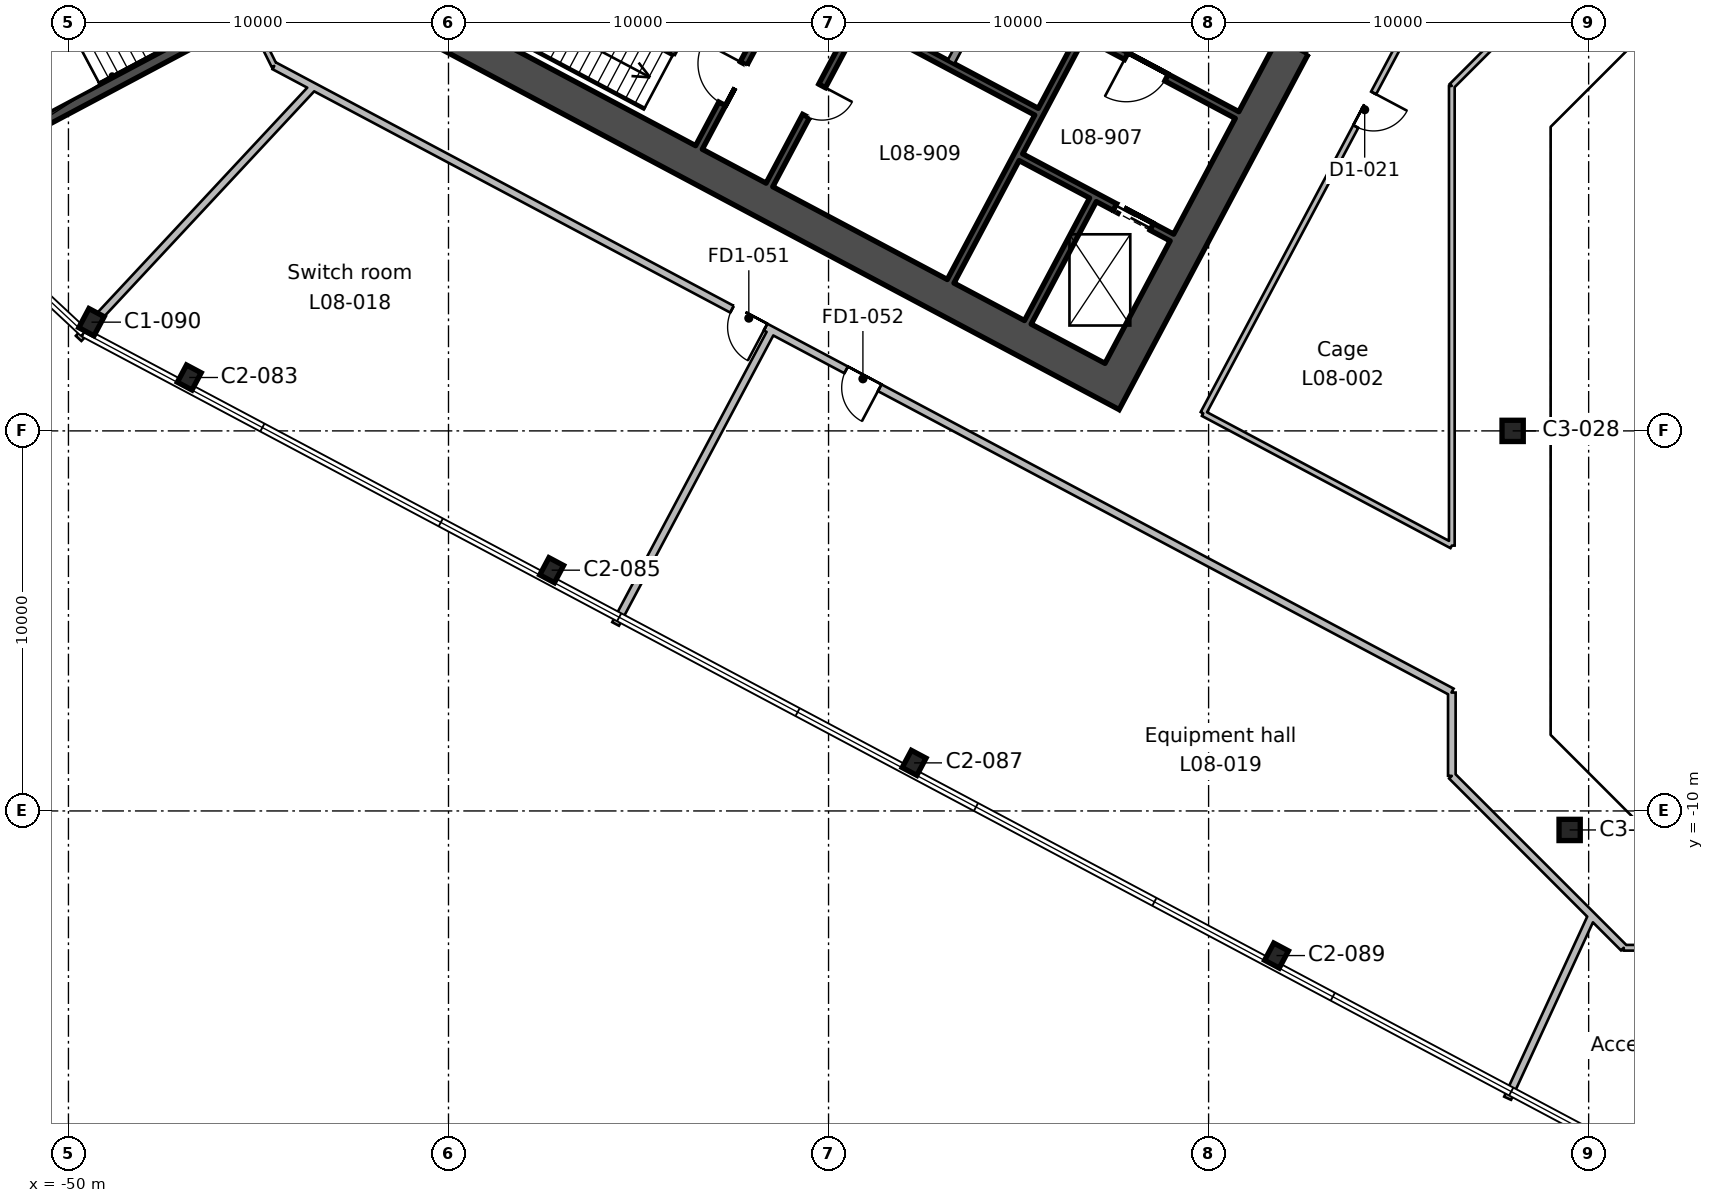
"""IFC4 building model, lengths in metres.
Left out: names, types, materials, properties, quantities, classifications, styles, units other than length and angle.
Written with IfcOpenShell. Run it as: python <this file> out.ifc"""

import sys

from ifc_helpers import new_model, si_unit, direction, frame, frame_2d, origin, origin_2d, place, context, subcontext, project, spatial, rectangle, hollow_rectangle, i_section, extrude, element, fill, save


model = new_model("IFC4")
c1 = context("Model", 3, precision=1e-05, world=origin(), true_north=direction((0.0, 1.0)))
c2 = subcontext(c1, "Body", "Model", "MODEL_VIEW")
j1 = project(units=[si_unit("LENGTHUNIT", "METRE"), si_unit("PLANEANGLEUNIT", "RADIAN")], contexts=[c1])
p1 = place(None, origin())
s1 = spatial("IfcSite", under=j1, at=p1, CompositionType="ELEMENT")
p2 = place(p1, origin())
s2 = spatial("IfcBuilding", under=s1, at=p2, CompositionType="ELEMENT")
p3 = place(p2, frame((0.0, 0.0, 44.6)))
s3 = spatial("IfcBuildingStorey", under=s2, at=p3, CompositionType="ELEMENT", Elevation=44.6)
p4 = place(p3, frame((-18.213, -13.805, 0.0), z_axis=(0.0, 0.0, 1.0), x_axis=(0.882947592859, -0.469471562786, 0.0)))
e1 = element("IfcColumn", 1, at=p4, inside=s3, PredefinedType="COLUMN", context=c2, shape_type="SweptSolid", body=[
    extrude(i_section(OverallWidth=0.437, OverallDepth=0.513, WebThickness=0.061, FlangeThickness=0.097, FilletRadius=0.015, at=origin_2d()), origin(), (0.0, 0.0, 1.0), 5.4),
])
p5 = place(p3, frame((-10.5, -10.5, 0.0), z_axis=(0.0, 0.0, 1.0), x_axis=(1.0, 0.0, 0.0)))
e2 = element("IfcColumn", 2, at=p5, inside=s3, PredefinedType="COLUMN", context=c2, shape_type="SweptSolid", body=[
    extrude(hollow_rectangle(XDim=0.559, YDim=0.559, WallThickness=0.024, InnerFilletRadius=0.012, OuterFilletRadius=0.035, at=origin_2d()), origin(), (0.0, 0.0, 1.0), 5.4),
])
for number, where, z_axis, x_axis in (
    (3, (-27.749, -8.735, 0.0), (0.0, 0.0, 1.0), (0.883, -0.469, 0.0)),
    (4, (-37.285, -3.665, 0.0), (0.0, 0.0, 1.0), (0.883, -0.469, 0.0)),
):
    element("IfcColumn", number, at=place(p3, frame(where, z_axis=z_axis, x_axis=x_axis)), inside=s3, PredefinedType="COLUMN", context=c2, shape_type="SweptSolid", body=[
        extrude(i_section(OverallWidth=0.437, OverallDepth=0.513, WebThickness=0.061, FlangeThickness=0.097, FilletRadius=0.015, at=origin_2d()), origin(), (0.0, 0.0, 1.0), 5.4),
    ])
p6 = place(p3, frame((-12.0, 0.0, 0.0), z_axis=(0.0, 0.0, 1.0), x_axis=(1.0, 0.0, 0.0)))
e5 = element("IfcColumn", 5, at=p6, inside=s3, PredefinedType="COLUMN", context=c2, shape_type="SweptSolid", body=[
    extrude(hollow_rectangle(XDim=0.559, YDim=0.559, WallThickness=0.024, InnerFilletRadius=0.012, OuterFilletRadius=0.035, at=origin_2d()), origin(), (0.0, 0.0, 1.0), 5.4),
])
p7 = place(p3, frame((-46.821, 1.405, 0.0), z_axis=(0.0, 0.0, 1.0), x_axis=(0.882947592859, -0.469471562786, 0.0)))
e6 = element("IfcColumn", 6, at=p7, inside=s3, PredefinedType="COLUMN", context=c2, shape_type="SweptSolid", body=[
    extrude(i_section(OverallWidth=0.437, OverallDepth=0.513, WebThickness=0.061, FlangeThickness=0.097, FilletRadius=0.015, at=origin_2d()), origin(), (0.0, 0.0, 1.0), 5.4),
])
p8 = place(p3, frame((-49.394, 2.861, 0.0), z_axis=(0.0, 0.0, 1.0), x_axis=(0.882947592859, -0.469471562786, 0.0)))
e7 = element("IfcColumn", 7, at=p8, inside=s3, PredefinedType="COLUMN", context=c2, shape_type="SweptSolid", body=[
    extrude(i_section(OverallWidth=0.455, OverallDepth=0.569, WebThickness=0.078, FlangeThickness=0.125, FilletRadius=0.015, at=origin_2d()), origin(), (0.0, 0.0, 1.0), 5.4),
])
p9 = place(p3, frame((-13.362, 18.43, 0.0), z_axis=(0.0, 0.0, 1.0), x_axis=(-0.46947084998, -0.882947971864, 0.0)))
e8 = element("IfcWall", 8, at=p9, inside=s3, PredefinedType="SHEAR", context=c2, shape_type="SweptSolid", body=[
    extrude(rectangle(XDim=20.0, YDim=0.9, at=frame_2d((10.0, 0.0))), origin(), (0.0, 0.0, 1.0), 5.4),
])
p10 = place(p9, frame((7.0, 0.0, 0.0)))
e9 = element("IfcOpeningElement", 9, at=p10, cuts=e8, PredefinedType="OPENING", context=c2, shape_type="SweptSolid", body=[
    extrude(rectangle(XDim=2.4, YDim=2.4, at=frame_2d((1.2, 1.2))), frame((0.0, 0.46, 0.0), z_axis=(0.0, -1.0, 0.0), x_axis=(1.0, 0.0, 0.0)), (0.0, 0.0, 1.0), 0.92),
])
p11 = place(p3, frame((-22.937, 1.38, 0.0), z_axis=(0.0, 0.0, 1.0), x_axis=(-0.88295276571, 0.46946183394, 0.0)))
e10 = element("IfcWall", 10, at=p11, inside=s3, PredefinedType="SHEAR", context=c2, shape_type="SweptSolid", body=[
    extrude(rectangle(XDim=20.2, YDim=0.9, at=frame_2d((10.1, 0.0))), origin(), (0.0, 0.0, 1.0), 5.4),
])
p12 = place(p3, frame((-23.043, 6.08, 0.0), z_axis=(0.0, 0.0, 1.0), x_axis=(-0.469494272526, -0.882935517501, 0.0)))
e11 = element("IfcWall", 11, at=p12, inside=s3, PredefinedType="SHEAR", context=c2, shape_type="SweptSolid", body=[
    extrude(rectangle(XDim=3.65, YDim=0.2, at=frame_2d((1.825, 0.0))), origin(), (0.0, 0.0, 1.0), 5.4),
])
p13 = place(p3, frame((-23.36, 10.382, 0.0), z_axis=(0.0, 0.0, 1.0), x_axis=(-0.469480409012, -0.88294288918, 0.0)))
e12 = element("IfcWall", 12, at=p13, inside=s3, PredefinedType="SHEAR", context=c2, shape_type="SweptSolid", body=[
    extrude(rectangle(XDim=7.3, YDim=0.2, at=frame_2d((3.65, 0.0))), origin(), (0.0, 0.0, 1.0), 5.4),
])
p14 = place(p3, frame((-25.744, 11.65, 0.0), z_axis=(0.0, 0.0, 1.0), x_axis=(-0.469487830541, -0.882938942948, 0.0)))
e13 = element("IfcWall", 13, at=p14, inside=s3, PredefinedType="SOLIDWALL", context=c2, shape_type="SweptSolid", body=[
    extrude(rectangle(XDim=2.2, YDim=0.2, at=frame_2d((1.1, 0.0))), origin(), (0.0, 0.0, 1.0), 5.4),
])
p15 = place(p3, frame((-28.128, 12.917, 0.0), z_axis=(0.0, 0.0, 1.0), x_axis=(-0.469454336211, -0.882956752176, 0.0)))
e14 = element("IfcWall", 14, at=p15, inside=s3, PredefinedType="SHEAR", context=c2, shape_type="SweptSolid", body=[
    extrude(rectangle(XDim=7.3, YDim=0.2, at=frame_2d((3.65, 0.0))), origin(), (0.0, 0.0, 1.0), 5.4),
])
p16 = place(p15, frame((4.35, 0.0, 0.0)))
e15 = element("IfcOpeningElement", 15, at=p16, cuts=e14, PredefinedType="OPENING", context=c2, shape_type="SweptSolid", body=[
    extrude(rectangle(XDim=0.9, YDim=2.1, at=frame_2d((0.45, 1.05))), frame((0.0, 0.11, 0.0), z_axis=(0.0, -1.0, 0.0), x_axis=(1.0, 0.0, 0.0)), (0.0, 0.0, 1.0), 0.22),
])
p17 = place(p3, frame((-29.982, 13.903, 0.0), z_axis=(0.0, 0.0, 1.0), x_axis=(-0.469454336211, -0.882956752176, 0.0)))
e16 = element("IfcWall", 16, at=p17, inside=s3, PredefinedType="SHEAR", context=c2, shape_type="SweptSolid", body=[
    extrude(rectangle(XDim=7.3, YDim=0.2, at=frame_2d((3.65, 0.0))), origin(), (0.0, 0.0, 1.0), 5.4),
])
p18 = place(p17, frame((4.8, 0.0, 0.0)))
e17 = element("IfcOpeningElement", 17, at=p18, cuts=e16, PredefinedType="OPENING", context=c2, shape_type="SweptSolid", body=[
    extrude(rectangle(XDim=1.2, YDim=2.1, at=frame_2d((0.6, 1.05))), frame((0.0, 0.11, 0.0), z_axis=(0.0, -1.0, 0.0), x_axis=(1.0, 0.0, 0.0)), (0.0, 0.0, 1.0), 0.22),
])
p19 = place(p3, frame((-19.252, 8.311, 0.0), z_axis=(0.0, 0.0, 1.0), x_axis=(-0.882955722218, 0.469456273365, 0.0)))
e18 = element("IfcWall", 18, at=p19, inside=s3, PredefinedType="SHEAR", context=c2, shape_type="SweptSolid", body=[
    extrude(rectangle(XDim=10.0, YDim=0.2, at=frame_2d((5.0, 0.0))), origin(), (0.0, 0.0, 1.0), 5.4),
])
p20 = place(p19, frame((2.1, 0.0, 0.0)))
e19 = element("IfcOpeningElement", 19, at=p20, cuts=e18, PredefinedType="OPENING", context=c2, shape_type="SweptSolid", body=[
    extrude(rectangle(XDim=1.2, YDim=2.1, at=frame_2d((0.6, 1.05))), frame((0.0, 0.11, 0.0), z_axis=(0.0, -1.0, 0.0), x_axis=(1.0, 0.0, 0.0)), (0.0, 0.0, 1.0), 0.22),
])
p21 = place(p3, frame((-24.528, 8.398, 0.0), z_axis=(0.0, 0.0, 1.0), x_axis=(-0.882953967957, 0.469459572775, 0.0)))
e20 = element("IfcWall", 20, at=p21, inside=s3, PredefinedType="SHEAR", context=c2, shape_type="SweptSolid", body=[
    extrude(rectangle(XDim=5.2, YDim=0.2, at=frame_2d((2.6, 0.0))), origin(), (0.0, 0.0, 1.0), 5.4),
])
p22 = place(p3, frame((-20.965, 5.088, 0.0), z_axis=(0.0, 0.0, 1.0), x_axis=(-0.882925986334, 0.469512196493, 0.0)))
e21 = element("IfcWall", 21, at=p22, inside=s3, PredefinedType="SHEAR", context=c2, shape_type="SweptSolid", body=[
    extrude(rectangle(XDim=4.5, YDim=0.2, at=frame_2d((2.25, 0.0))), origin(), (0.0, 0.0, 1.0), 5.4),
])
p23 = place(p22, frame((0.6, 0.0, 0.0)))
e22 = element("IfcOpeningElement", 22, at=p23, cuts=e21, PredefinedType="OPENING", context=c2, shape_type="SweptSolid", body=[
    extrude(rectangle(XDim=1.1, YDim=2.1, at=frame_2d((0.55, 1.05))), frame((0.0, 0.11, 0.0), z_axis=(0.0, -1.0, 0.0), x_axis=(1.0, 0.0, 0.0)), (0.0, 0.0, 1.0), 0.22),
])
p24 = place(p3, frame((-45.297, 11.007, 0.0), z_axis=(0.0, 0.0, 1.0), x_axis=(-0.882951519127, -0.469464178475, 0.0)))
e23 = element("IfcWall", 23, at=p24, inside=s3, PredefinedType="SHEAR", context=c2, shape_type="SweptSolid", body=[
    extrude(rectangle(XDim=8.3, YDim=0.3, at=frame_2d((4.15, 0.0))), origin(), (0.0, 0.0, 1.0), 5.4),
])
p25 = place(p3, frame((-49.733, 2.433, 0.0), z_axis=(0.0, 0.0, 1.0), x_axis=(0.682002261255, 0.731350063679, 0.0)))
e24 = element("IfcWall", 24, at=p25, inside=s3, PredefinedType="PARTITIONING", context=c2, shape_type="SweptSolid", body=[
    extrude(rectangle(XDim=9.059, YDim=0.2, at=frame_2d((4.529, 0.0))), origin(), (0.0, 0.0, 1.0), 4.95),
])
p26 = place(p3, frame((-31.495, 2.646, 0.0), z_axis=(0.0, 0.0, 1.0), x_axis=(-0.469461194384, -0.882953105758, 0.0)))
e25 = element("IfcWall", 25, at=p26, inside=s3, PredefinedType="PARTITIONING", context=c2, shape_type="SweptSolid", body=[
    extrude(rectangle(XDim=8.75, YDim=0.2, at=frame_2d((4.375, 0.0))), origin(), (0.0, 0.0, 1.0), 4.95),
])
p27 = place(p3, frame((-13.6, -6.869, 0.0), z_axis=(0.0, 0.0, 1.0), x_axis=(-0.88295406426, 0.469459391648, 0.0)))
e26 = element("IfcWall", 26, at=p27, inside=s3, PredefinedType="PARTITIONING", context=c2, shape_type="SweptSolid", body=[
    extrude(rectangle(XDim=35.091, YDim=0.2, at=frame_2d((17.545, 0.0))), origin(), (0.0, 0.0, 1.0), 4.95),
])
p28 = place(p27, frame((20.45, 0.0, 0.0)))
e27 = element("IfcOpeningElement", 27, at=p28, cuts=e26, PredefinedType="OPENING", context=c2, shape_type="SweptSolid", body=[
    extrude(rectangle(XDim=1.0, YDim=2.1, at=frame_2d((0.5, 1.05))), frame((0.0, 0.11, 0.0), z_axis=(0.0, -1.0, 0.0), x_axis=(1.0, 0.0, 0.0)), (0.0, 0.0, 1.0), 0.22),
])
p29 = place(p27, frame((17.05, 0.0, 0.0)))
e28 = element("IfcOpeningElement", 28, at=p29, cuts=e26, PredefinedType="OPENING", context=c2, shape_type="SweptSolid", body=[
    extrude(rectangle(XDim=1.0, YDim=2.1, at=frame_2d((0.5, 1.05))), frame((0.0, 0.11, 0.0), z_axis=(0.0, -1.0, 0.0), x_axis=(1.0, 0.0, 0.0)), (0.0, 0.0, 1.0), 0.22),
])
p30 = place(p3, frame((-44.584, 9.605, 0.0), z_axis=(0.0, 0.0, 1.0), x_axis=(-0.445453249083, 0.895305200968, 0.0)))
e29 = element("IfcWall", 29, at=p30, inside=s3, PredefinedType="PARTITIONING", context=c2, shape_type="SweptSolid", body=[
    extrude(rectangle(XDim=1.443, YDim=0.15, at=frame_2d((0.722, 0.0))), origin(), (0.0, 0.0, 1.0), 4.95),
])
p31 = place(p3, frame((-20.142, 0.46, 0.0), z_axis=(0.0, 0.0, 1.0), x_axis=(0.469506937019, 0.882928783136, 0.0)))
e30 = element("IfcWall", 30, at=p31, inside=s3, PredefinedType="PARTITIONING", context=c2, shape_type="SweptSolid", body=[
    extrude(rectangle(XDim=18.1, YDim=0.15, at=frame_2d((9.05, 0.0))), origin(), (0.0, 0.0, 1.0), 4.95),
])
p32 = place(p31, frame((8.55, 0.0, 0.0)))
e31 = element("IfcOpeningElement", 31, at=p32, cuts=e30, PredefinedType="OPENING", context=c2, shape_type="SweptSolid", body=[
    extrude(rectangle(XDim=1.0, YDim=2.1, at=frame_2d((0.5, 1.05))), frame((0.0, 0.085, 0.0), z_axis=(0.0, -1.0, 0.0), x_axis=(1.0, 0.0, 0.0)), (0.0, 0.0, 1.0), 0.17),
])
p33 = place(p3, frame((-13.6, -3.019, 0.0), z_axis=(0.0, 0.0, 1.0), x_axis=(-0.882915984826, 0.469531004022, 0.0)))
e32 = element("IfcWall", 32, at=p33, inside=s3, PredefinedType="PARTITIONING", context=c2, shape_type="SweptSolid", body=[
    extrude(rectangle(XDim=7.409, YDim=0.15, at=frame_2d((3.705, 0.0))), origin(), (0.0, 0.0, 1.0), 4.95),
])
p34 = place(p3, frame((-9.918, -12.759, 0.0), z_axis=(0.0, 0.0, 1.0), x_axis=(-0.707106781187, 0.707106781187, 0.0)))
e33 = element("IfcWall", 33, at=p34, inside=s3, PredefinedType="PARTITIONING", context=c2, shape_type="SweptSolid", body=[
    extrude(rectangle(XDim=5.207, YDim=0.2, at=frame_2d((2.604, 0.0))), origin(), (0.0, 0.0, 1.0), 4.95),
])
p35 = place(p3, frame((-13.6, -9.077, 0.0), z_axis=(0.0, 0.0, 1.0), x_axis=(0.0, 1.0, 0.0)))
e34 = element("IfcWall", 34, at=p35, inside=s3, PredefinedType="PARTITIONING", context=c2, shape_type="SweptSolid", body=[
    extrude(rectangle(XDim=2.192, YDim=0.2, at=frame_2d((1.096, 0.0))), origin(), (0.0, 0.0, 1.0), 4.95),
])
p36 = place(p3, frame((-13.6, 9.077, 0.0), z_axis=(0.0, 0.0, 1.0), x_axis=(0.0, -1.0, 0.0)))
e35 = element("IfcWall", 35, at=p36, inside=s3, PredefinedType="PARTITIONING", context=c2, shape_type="SweptSolid", body=[
    extrude(rectangle(XDim=12.096, YDim=0.15, at=frame_2d((6.048, 0.0))), origin(), (0.0, 0.0, 1.0), 4.95),
])
p37 = place(p3, frame((-13.6, 9.077, 0.0), z_axis=(0.0, 0.0, 1.0), x_axis=(0.707106781187, 0.707106781187, 0.0)))
e36 = element("IfcWall", 36, at=p37, inside=s3, PredefinedType="PARTITIONING", context=c2, shape_type="SweptSolid", body=[
    extrude(rectangle(XDim=6.397, YDim=0.15, at=frame_2d((3.198, 0.0))), origin(), (0.0, 0.0, 1.0), 4.95),
])
p38 = place(p3, frame((-9.918, -12.759, 0.0), z_axis=(0.0, 0.0, 1.0), x_axis=(-0.41878582264, -0.908085037183, 0.0)))
e37 = element("IfcWall", 37, at=p38, inside=s3, PredefinedType="PARTITIONING", context=c2, shape_type="SweptSolid", body=[
    extrude(rectangle(XDim=5.287, YDim=0.2, at=frame_2d((2.644, 0.0))), origin(), (0.0, 0.0, 1.0), 4.95),
])
p39 = place(p3, frame((-3.888, -13.6, 0.0), z_axis=(0.0, 0.0, 1.0), x_axis=(-1.0, 0.0, 0.0)))
e38 = element("IfcWall", 38, at=p39, inside=s3, PredefinedType="PARTITIONING", context=c2, shape_type="SweptSolid", body=[
    extrude(rectangle(XDim=5.189, YDim=0.15, at=frame_2d((2.594, 0.0))), origin(), (0.0, 0.0, 1.0), 4.95),
])
p40 = place(p39, frame((2.05, 0.0, 0.0)))
e39 = element("IfcOpeningElement", 39, at=p40, cuts=e38, PredefinedType="OPENING", context=c2, shape_type="SweptSolid", body=[
    extrude(rectangle(XDim=0.95, YDim=2.1, at=frame_2d((0.475, 1.05))), frame((0.0, 0.085, 0.0), z_axis=(0.0, -1.0, 0.0), x_axis=(1.0, 0.0, 0.0)), (0.0, 0.0, 1.0), 0.17),
])
p41 = place(p3, frame((-9.077, -13.6, 0.0), z_axis=(0.0, 0.0, 1.0), x_axis=(-0.707106781187, 0.707106781187, 0.0)))
e40 = element("IfcWall", 40, at=p41, inside=s3, PredefinedType="PARTITIONING", context=c2, shape_type="SweptSolid", body=[
    extrude(rectangle(XDim=1.189, YDim=0.2, at=frame_2d((0.595, 0.0))), origin(), (0.0, 0.0, 1.0), 4.95),
])
p42 = place(p20, origin())
e41 = element("IfcDoor", 41, at=p42, inside=s3, OperationType="SINGLE_SWING_RIGHT", PredefinedType="DOOR", context=c2, shape_type="SweptSolid", body=[
    extrude(rectangle(XDim=1.2, YDim=2.1, at=frame_2d((0.6, 1.05))), frame((0.0, 0.025, 0.0), z_axis=(0.0, -1.0, 0.0), x_axis=(1.0, 0.0, 0.0)), (0.0, 0.0, 1.0), 0.05),
])
fill(e19, e41)
p43 = place(p18, frame((1.2, 0.0, 0.0), z_axis=(0.0, 0.0, 1.0), x_axis=(-1.0, 0.0, 0.0)))
e42 = element("IfcDoor", 42, at=p43, inside=s3, OperationType="SINGLE_SWING_RIGHT", PredefinedType="DOOR", context=c2, shape_type="SweptSolid", body=[
    extrude(rectangle(XDim=1.2, YDim=2.1, at=frame_2d((0.6, 1.05))), frame((0.0, 0.025, 0.0), z_axis=(0.0, -1.0, 0.0), x_axis=(1.0, 0.0, 0.0)), (0.0, 0.0, 1.0), 0.05),
])
fill(e17, e42)
p44 = place(p23, origin())
e43 = element("IfcDoor", 43, at=p44, inside=s3, OperationType="DOUBLE_DOOR_SLIDING", PredefinedType="DOOR", context=c2, shape_type="SweptSolid", body=[
    extrude(rectangle(XDim=1.1, YDim=2.1, at=frame_2d((0.55, 1.05))), frame((0.0, 0.025, 0.0), z_axis=(0.0, -1.0, 0.0), x_axis=(1.0, 0.0, 0.0)), (0.0, 0.0, 1.0), 0.05),
])
fill(e22, e43)
p45 = place(p16, origin())
e44 = element("IfcDoor", 44, at=p45, inside=s3, OperationType="SINGLE_SWING_LEFT", PredefinedType="DOOR", context=c2, shape_type="SweptSolid", body=[
    extrude(rectangle(XDim=0.9, YDim=2.1, at=frame_2d((0.45, 1.05))), frame((0.0, 0.025, 0.0), z_axis=(0.0, -1.0, 0.0), x_axis=(1.0, 0.0, 0.0)), (0.0, 0.0, 1.0), 0.05),
])
fill(e15, e44)
p46 = place(p32, frame((1.0, 0.0, 0.0), z_axis=(0.0, 0.0, 1.0), x_axis=(-1.0, 0.0, 0.0)))
e45 = element("IfcDoor", 45, at=p46, inside=s3, OperationType="SINGLE_SWING_LEFT", PredefinedType="DOOR", context=c2, shape_type="SweptSolid", body=[
    extrude(rectangle(XDim=1.0, YDim=2.1, at=frame_2d((0.5, 1.05))), frame((0.0, 0.025, 0.0), z_axis=(0.0, -1.0, 0.0), x_axis=(1.0, 0.0, 0.0)), (0.0, 0.0, 1.0), 0.05),
])
fill(e31, e45)
p47 = place(p28, origin())
e46 = element("IfcDoor", 46, at=p47, inside=s3, OperationType="SINGLE_SWING_LEFT", PredefinedType="DOOR", context=c2, shape_type="SweptSolid", body=[
    extrude(rectangle(XDim=1.0, YDim=2.1, at=frame_2d((0.5, 1.05))), frame((0.0, 0.025, 0.0), z_axis=(0.0, -1.0, 0.0), x_axis=(1.0, 0.0, 0.0)), (0.0, 0.0, 1.0), 0.05),
])
fill(e27, e46)
p48 = place(p29, origin())
e47 = element("IfcDoor", 47, at=p48, inside=s3, OperationType="SINGLE_SWING_LEFT", PredefinedType="DOOR", context=c2, shape_type="SweptSolid", body=[
    extrude(rectangle(XDim=1.0, YDim=2.1, at=frame_2d((0.5, 1.05))), frame((0.0, 0.025, 0.0), z_axis=(0.0, -1.0, 0.0), x_axis=(1.0, 0.0, 0.0)), (0.0, 0.0, 1.0), 0.05),
])
fill(e28, e47)
save(model, sys.argv[1])
